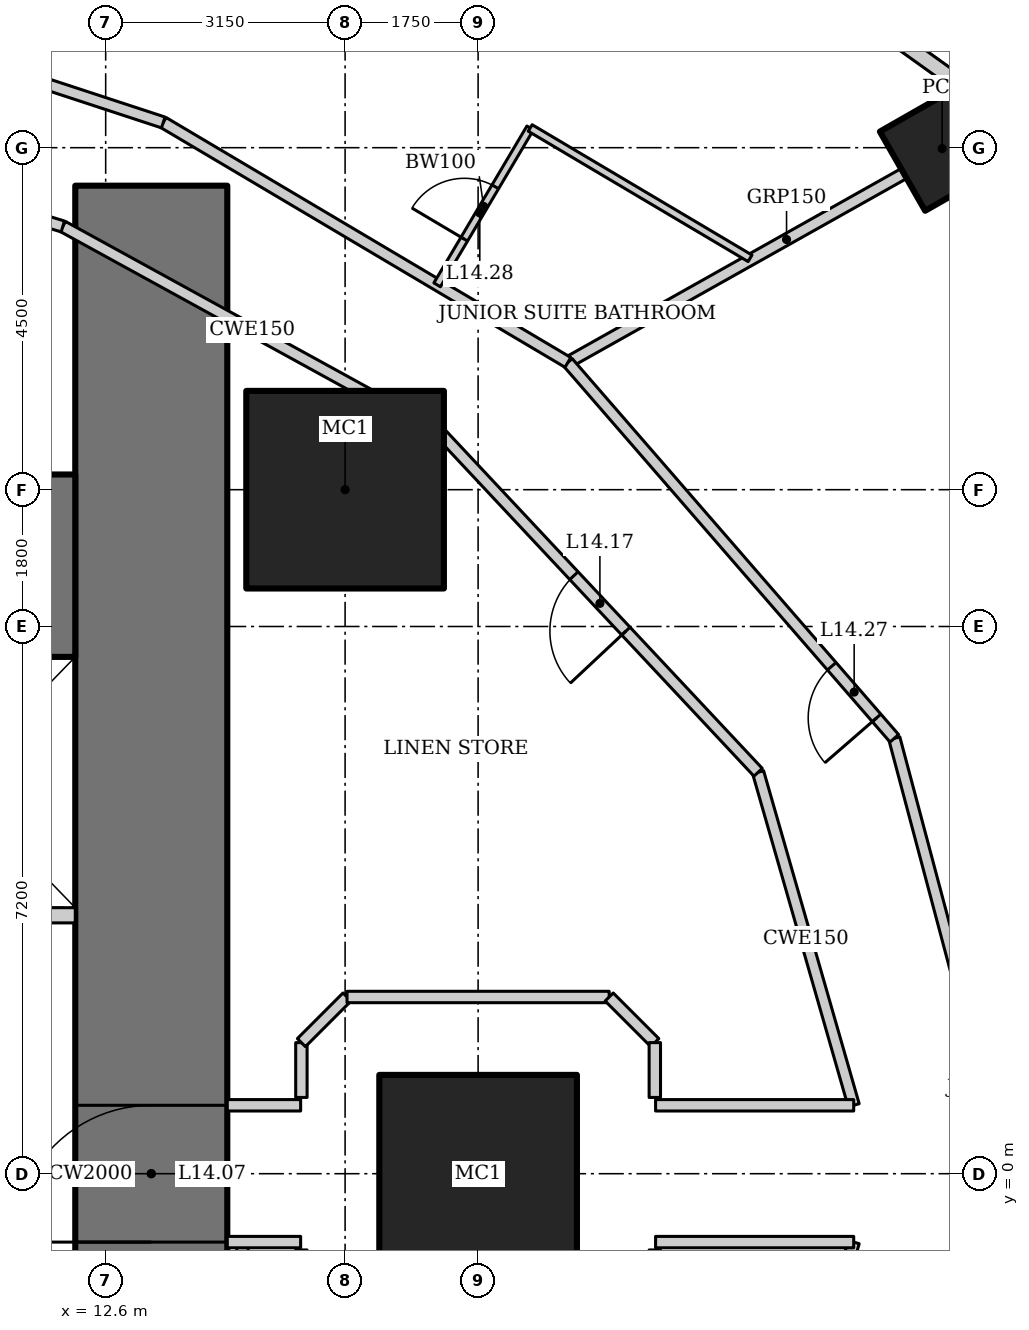
"""IFC4 building model, lengths in metres.
Left out: names, types, materials, properties, quantities, classifications, styles, units other than length and angle.
Written with IfcOpenShell. Run it as: python <this file> out.ifc"""

import sys

from ifc_helpers import new_model, si_unit, direction, frame, frame_2d, origin, origin_2d, place, context, subcontext, project, spatial, rectangle, hollow_rectangle, extrude, element, fill, save


model = new_model("IFC4")
c1 = context("Model", 3, precision=1e-05, world=origin(), true_north=direction((0.0, 1.0)))
c2 = subcontext(c1, "Body", "Model", "MODEL_VIEW")
j1 = project(units=[si_unit("LENGTHUNIT", "METRE"), si_unit("PLANEANGLEUNIT", "RADIAN")], contexts=[c1])
p1 = place(None, origin())
s1 = spatial("IfcSite", under=j1, at=p1, CompositionType="ELEMENT")
p2 = place(p1, origin())
s2 = spatial("IfcBuilding", under=s1, at=p2, CompositionType="ELEMENT")
p3 = place(p2, frame((0.0, 0.0, 65.8)))
s3 = spatial("IfcBuildingStorey", under=s2, at=p3, CompositionType="ELEMENT", Elevation=65.8)
for number, where, z_axis, x_axis in (
    (1, (17.5, 0.0, 0.0), (0.0, 0.0, 1.0), (1.0, 0.0, 0.0)),
    (2, (15.75, 9.0, 0.0), (0.0, 0.0, 1.0), (1.0, 0.0, 0.0)),
):
    element("IfcColumn", number, at=place(p3, frame(where, z_axis=z_axis, x_axis=x_axis)), inside=s3, PredefinedType="COLUMN", context=c2, shape_type="SweptSolid", body=[
        extrude(hollow_rectangle(XDim=2.6, YDim=2.6, WallThickness=0.13, at=origin_2d()), origin(), (0.0, 0.0, 1.0), 3.6),
    ])
p4 = place(p3, frame((23.605, 13.489, 0.0), z_axis=(0.0, 0.0, 1.0), x_axis=(0.86824298017, 0.496139221777, 0.0)))
e3 = element("IfcColumn", 3, at=p4, inside=s3, PredefinedType="COLUMN", context=c2, shape_type="SweptSolid", body=[
    extrude(hollow_rectangle(XDim=1.2, YDim=1.2, WallThickness=0.12, at=origin_2d()), origin(), (0.0, 0.0, 1.0), 3.6),
])
p5 = place(p3, frame((13.2, -13.0, 0.0), z_axis=(0.0, 0.0, 1.0), x_axis=(0.0, 1.0, 0.0)))
e4 = element("IfcWall", 4, at=p5, inside=s3, PredefinedType="SHEAR", context=c2, shape_type="SweptSolid", body=[
    extrude(rectangle(XDim=26.0, YDim=2.0, at=frame_2d((13.0, 0.0))), origin(), (0.0, 0.0, 1.0), 3.6),
])
p6 = place(p5, frame((12.1, 0.0, 0.0)))
e5 = element("IfcOpeningElement", 5, at=p6, cuts=e4, PredefinedType="OPENING", context=c2, shape_type="SweptSolid", body=[
    extrude(rectangle(XDim=1.8, YDim=2.1, at=frame_2d((0.9, 1.05))), frame((0.0, 1.01, 0.0), z_axis=(0.0, -1.0, 0.0), x_axis=(1.0, 0.0, 0.0)), (0.0, 0.0, 1.0), 2.02),
])
p7 = place(p3, frame((12.2, 8.0, 0.0), z_axis=(0.0, 0.0, 1.0), x_axis=(-1.0, 0.0, 0.0)))
e6 = element("IfcWall", 6, at=p7, inside=s3, PredefinedType="SHEAR", context=c2, shape_type="SweptSolid", body=[
    extrude(rectangle(XDim=24.4, YDim=2.4, at=frame_2d((12.2, 0.0))), origin(), (0.0, 0.0, 1.0), 3.6),
])
p8 = place(p3, frame((12.2, 3.4, 0.0), z_axis=(0.0, 0.0, 1.0), x_axis=(-1.0, 0.0, 0.0)))
e7 = element("IfcWall", 7, at=p8, inside=s3, PredefinedType="SOLIDWALL", context=c2, shape_type="SweptSolid", body=[
    extrude(rectangle(XDim=6.6, YDim=0.2, at=frame_2d((3.3, 0.0))), origin(), (0.0, 0.0, 1.0), 3.6),
])
p9 = place(p8, frame((4.45, 0.0, 0.0)))
e8 = element("IfcOpeningElement", 8, at=p9, cuts=e7, PredefinedType="OPENING", context=c2, shape_type="SweptSolid", body=[
    extrude(rectangle(XDim=1.1, YDim=2.2, at=frame_2d((0.55, 1.1))), frame((0.0, 0.11, 0.0), z_axis=(0.0, -1.0, 0.0), x_axis=(1.0, 0.0, 0.0)), (0.0, 0.0, 1.0), 0.22),
])
p10 = place(p8, frame((0.9, 0.0, 0.0)))
e9 = element("IfcOpeningElement", 9, at=p10, cuts=e7, PredefinedType="OPENING", context=c2, shape_type="SweptSolid", body=[
    extrude(rectangle(XDim=1.4, YDim=2.2, at=frame_2d((0.7, 1.1))), frame((0.0, 0.11, 0.0), z_axis=(0.0, -1.0, 0.0), x_axis=(1.0, 0.0, 0.0)), (0.0, 0.0, 1.0), 0.22),
])
p11 = place(p3, frame((24.482, 13.875, 0.0), z_axis=(0.0, 0.0, 1.0), x_axis=(-0.812791321576, 0.582554948112, 0.0)))
e10 = element("IfcWall", 10, at=p11, inside=s3, PredefinedType="SOLIDWALL", context=c2, shape_type="SweptSolid", body=[
    extrude(rectangle(XDim=8.063, YDim=0.2, at=frame_2d((4.032, 0.0))), origin(), (0.0, 0.0, 1.0), 3.4),
])
p12 = place(p11, frame((2.832, 0.0, 0.5)))
e11 = element("IfcOpeningElement", 11, at=p12, cuts=e10, PredefinedType="OPENING", context=c2, shape_type="SweptSolid", body=[
    extrude(rectangle(XDim=2.4, YDim=2.2, at=frame_2d((1.2, 1.1))), frame((0.0, 0.11, 0.0), z_axis=(0.0, -1.0, 0.0), x_axis=(1.0, 0.0, 0.0)), (0.0, 0.0, 1.0), 0.22),
])
p13 = place(p3, frame((24.435, 13.909, 0.0), z_axis=(0.0, 0.0, 1.0), x_axis=(-0.871747379892, -0.489955616001, 0.0)))
e12 = element("IfcWall", 12, at=p13, inside=s3, PredefinedType="PARTITIONING", context=c2, shape_type="SweptSolid", body=[
    extrude(rectangle(XDim=6.6, YDim=0.15, at=frame_2d((3.3, 0.0))), origin(), (0.0, 0.0, 1.0), 2.693),
])
p14 = place(p3, frame((24.5, 0.0, 0.0), z_axis=(0.0, 0.0, 1.0), x_axis=(-0.257083265334, 0.966389256296, 0.0)))
e13 = element("IfcWall", 13, at=p14, inside=s3, PredefinedType="PARTITIONING", context=c2, shape_type="SweptSolid", body=[
    extrude(rectangle(XDim=5.928, YDim=0.15, at=frame_2d((2.964, 0.0))), origin(), (0.0, 0.0, 1.0), 3.45),
])
p15 = place(p3, frame((22.976, 5.729, 0.0), z_axis=(0.0, 0.0, 1.0), x_axis=(-0.655599989166, 0.755108372491, 0.0)))
e14 = element("IfcWall", 14, at=p15, inside=s3, PredefinedType="PARTITIONING", context=c2, shape_type="SweptSolid", body=[
    extrude(rectangle(XDim=6.551, YDim=0.15, at=frame_2d((3.275, 0.0))), origin(), (0.0, 0.0, 1.0), 3.45),
])
p16 = place(p15, frame((0.356, 0.0, 0.0)))
e15 = element("IfcOpeningElement", 15, at=p16, cuts=e14, PredefinedType="OPENING", context=c2, shape_type="SweptSolid", body=[
    extrude(rectangle(XDim=0.9, YDim=2.1, at=frame_2d((0.45, 1.05))), frame((0.0, 0.085, 0.0), z_axis=(0.0, -1.0, 0.0), x_axis=(1.0, 0.0, 0.0)), (0.0, 0.0, 1.0), 0.17),
])
p17 = place(p3, frame((18.681, 10.675, 0.0), z_axis=(0.0, 0.0, 1.0), x_axis=(-0.860147339762, 0.510045639036, 0.0)))
e16 = element("IfcWall", 16, at=p17, inside=s3, PredefinedType="PARTITIONING", context=c2, shape_type="SweptSolid", body=[
    extrude(rectangle(XDim=6.19, YDim=0.15, at=frame_2d((3.095, 0.0))), origin(), (0.0, 0.0, 1.0), 3.45),
])
p18 = place(p3, frame((13.357, 13.832, 0.0), z_axis=(0.0, 0.0, 1.0), x_axis=(-0.950106803111, 0.311924770869, 0.0)))
e17 = element("IfcWall", 17, at=p18, inside=s3, PredefinedType="PARTITIONING", context=c2, shape_type="SweptSolid", body=[
    extrude(rectangle(XDim=5.689, YDim=0.15, at=frame_2d((2.845, 0.0))), origin(), (0.0, 0.0, 1.0), 3.45),
])
p19 = place(p18, frame((4.639, 0.0, 0.0)))
e18 = element("IfcOpeningElement", 18, at=p19, cuts=e17, PredefinedType="OPENING", context=c2, shape_type="SweptSolid", body=[
    extrude(rectangle(XDim=0.9, YDim=2.1, at=frame_2d((0.45, 1.05))), frame((0.0, 0.085, 0.0), z_axis=(0.0, -1.0, 0.0), x_axis=(1.0, 0.0, 0.0)), (0.0, 0.0, 1.0), 0.17),
])
p20 = place(p3, frame((22.976, -5.729, 0.0), z_axis=(0.0, 0.0, 1.0), x_axis=(0.257083265334, 0.966389256296, 0.0)))
e19 = element("IfcWall", 19, at=p20, inside=s3, PredefinedType="PARTITIONING", context=c2, shape_type="SweptSolid", body=[
    extrude(rectangle(XDim=5.928, YDim=0.15, at=frame_2d((2.964, 0.0))), origin(), (0.0, 0.0, 1.0), 3.45),
])
p21 = place(p20, frame((1.794, 0.0, 0.0)))
e20 = element("IfcOpeningElement", 20, at=p21, cuts=e19, PredefinedType="OPENING", context=c2, shape_type="SweptSolid", body=[
    extrude(rectangle(XDim=0.9, YDim=2.1, at=frame_2d((0.45, 1.05))), frame((0.0, 0.085, 0.0), z_axis=(0.0, -1.0, 0.0), x_axis=(1.0, 0.0, 0.0)), (0.0, 0.0, 1.0), 0.17),
])
p22 = place(p3, frame((22.442, 0.9, 0.0), z_axis=(0.0, 0.0, 1.0), x_axis=(-0.27585972825, 0.961197903831, 0.0)))
e21 = element("IfcWall", 21, at=p22, inside=s3, PredefinedType="PARTITIONING", context=c2, shape_type="SweptSolid", body=[
    extrude(rectangle(XDim=4.559, YDim=0.15, at=frame_2d((2.279, 0.0))), origin(), (0.0, 0.0, 1.0), 3.45),
])
p23 = place(p3, frame((21.184, 5.282, 0.0), z_axis=(0.0, 0.0, 1.0), x_axis=(-0.68365836236, 0.729802194828, 0.0)))
e22 = element("IfcWall", 22, at=p23, inside=s3, PredefinedType="PARTITIONING", context=c2, shape_type="SweptSolid", body=[
    extrude(rectangle(XDim=6.09, YDim=0.15, at=frame_2d((3.045, 0.0))), origin(), (0.0, 0.0, 1.0), 3.45),
])
p24 = place(p23, frame((2.545, 0.0, 0.0)))
e23 = element("IfcOpeningElement", 23, at=p24, cuts=e22, PredefinedType="OPENING", context=c2, shape_type="SweptSolid", body=[
    extrude(rectangle(XDim=1.0, YDim=2.1, at=frame_2d((0.5, 1.05))), frame((0.0, 0.085, 0.0), z_axis=(0.0, -1.0, 0.0), x_axis=(1.0, 0.0, 0.0)), (0.0, 0.0, 1.0), 0.17),
])
p25 = place(p3, frame((17.021, 9.726, 0.0), z_axis=(0.0, 0.0, 1.0), x_axis=(-0.876522084062, 0.481361647986, 0.0)))
e24 = element("IfcWall", 24, at=p25, inside=s3, PredefinedType="PARTITIONING", context=c2, shape_type="SweptSolid", body=[
    extrude(rectangle(XDim=5.687, YDim=0.15, at=frame_2d((2.844, 0.0))), origin(), (0.0, 0.0, 1.0), 3.45),
])
p26 = place(p3, frame((12.036, 12.464, 0.0), z_axis=(0.0, 0.0, 1.0), x_axis=(-0.956795045135, 0.290763205385, 0.0)))
e25 = element("IfcWall", 25, at=p26, inside=s3, PredefinedType="PARTITIONING", context=c2, shape_type="SweptSolid", body=[
    extrude(rectangle(XDim=5.146, YDim=0.15, at=frame_2d((2.573, 0.0))), origin(), (0.0, 0.0, 1.0), 3.45),
])
p27 = place(p26, frame((0.816, 0.0, 0.0)))
e26 = element("IfcOpeningElement", 26, at=p27, cuts=e25, PredefinedType="OPENING", context=c2, shape_type="SweptSolid", body=[
    extrude(rectangle(XDim=0.9, YDim=2.1, at=frame_2d((0.45, 1.05))), frame((0.0, 0.085, 0.0), z_axis=(0.0, -1.0, 0.0), x_axis=(1.0, 0.0, 0.0)), (0.0, 0.0, 1.0), 0.17),
])
p28 = place(p3, frame((21.184, -5.282, 0.0), z_axis=(0.0, 0.0, 1.0), x_axis=(0.27585972825, 0.961197903831, 0.0)))
e27 = element("IfcWall", 27, at=p28, inside=s3, PredefinedType="PARTITIONING", context=c2, shape_type="SweptSolid", body=[
    extrude(rectangle(XDim=4.559, YDim=0.15, at=frame_2d((2.279, 0.0))), origin(), (0.0, 0.0, 1.0), 3.45),
])
p29 = place(p3, frame((14.4, -11.017, 0.0), z_axis=(0.0, 0.0, 1.0), x_axis=(0.0, 1.0, 0.0)))
e28 = element("IfcWall", 28, at=p29, inside=s3, PredefinedType="PARTITIONING", context=c2, shape_type="SweptSolid", body=[
    extrude(rectangle(XDim=10.117, YDim=0.15, at=frame_2d((5.059, 0.0))), origin(), (0.0, 0.0, 1.0), 3.45),
])
p30 = place(p3, frame((16.961, 11.695, 0.0), z_axis=(0.0, 0.0, 1.0), x_axis=(0.510075642074, 0.860129548012, 0.0)))
e29 = element("IfcWall", 29, at=p30, inside=s3, PredefinedType="PARTITIONING", context=c2, shape_type="SweptSolid", body=[
    extrude(rectangle(XDim=2.4, YDim=0.1, at=frame_2d((1.2, 0.0))), origin(), (0.0, 0.0, 1.0), 3.45),
])
p31 = place(p30, frame((0.7, 0.0, 0.0)))
e30 = element("IfcOpeningElement", 30, at=p31, cuts=e29, PredefinedType="OPENING", context=c2, shape_type="SweptSolid", body=[
    extrude(rectangle(XDim=0.8, YDim=2.1, at=frame_2d((0.4, 1.05))), frame((0.0, 0.06, 0.0), z_axis=(0.0, -1.0, 0.0), x_axis=(1.0, 0.0, 0.0)), (0.0, 0.0, 1.0), 0.12),
])
p32 = place(p3, frame((18.185, 13.76, 0.0), z_axis=(0.0, 0.0, 1.0), x_axis=(0.860146437071, -0.510047161343, 0.0)))
e31 = element("IfcWall", 31, at=p32, inside=s3, PredefinedType="PARTITIONING", context=c2, shape_type="SweptSolid", body=[
    extrude(rectangle(XDim=3.363, YDim=0.1, at=frame_2d((1.681, 0.0))), origin(), (0.0, 0.0, 1.0), 3.45),
])
p33 = place(p3, frame((14.2, -0.9, 0.0), z_axis=(0.0, 0.0, 1.0), x_axis=(1.0, 0.0, 0.0)))
e32 = element("IfcWall", 32, at=p33, inside=s3, PredefinedType="PARTITIONING", context=c2, shape_type="SweptSolid", body=[
    extrude(rectangle(XDim=0.965, YDim=0.15, at=frame_2d((0.482, 0.0))), origin(), (0.0, 0.0, 1.0), 3.45),
])
p34 = place(p3, frame((19.835, -0.9, 0.0), z_axis=(0.0, 0.0, 1.0), x_axis=(1.0, 0.0, 0.0)))
e33 = element("IfcWall", 33, at=p34, inside=s3, PredefinedType="PARTITIONING", context=c2, shape_type="SweptSolid", body=[
    extrude(rectangle(XDim=2.607, YDim=0.15, at=frame_2d((1.303, 0.0))), origin(), (0.0, 0.0, 1.0), 3.45),
])
p35 = place(p3, frame((14.2, 0.9, 0.0), z_axis=(0.0, 0.0, 1.0), x_axis=(1.0, 0.0, 0.0)))
e34 = element("IfcWall", 34, at=p35, inside=s3, PredefinedType="PARTITIONING", context=c2, shape_type="SweptSolid", body=[
    extrude(rectangle(XDim=0.965, YDim=0.15, at=frame_2d((0.482, 0.0))), origin(), (0.0, 0.0, 1.0), 3.45),
])
p36 = place(p3, frame((19.835, 0.9, 0.0), z_axis=(0.0, 0.0, 1.0), x_axis=(1.0, 0.0, 0.0)))
e35 = element("IfcWall", 35, at=p36, inside=s3, PredefinedType="PARTITIONING", context=c2, shape_type="SweptSolid", body=[
    extrude(rectangle(XDim=2.607, YDim=0.15, at=frame_2d((1.303, 0.0))), origin(), (0.0, 0.0, 1.0), 3.45),
])
p37 = place(p3, frame((15.175, 1.003, 0.0), z_axis=(0.0, 0.0, 1.0), x_axis=(0.0, 1.0, 0.0)))
e36 = element("IfcWall", 36, at=p37, inside=s3, PredefinedType="PARTITIONING", context=c2, shape_type="SweptSolid", body=[
    extrude(rectangle(XDim=0.721, YDim=0.15, at=frame_2d((0.361, 0.0))), origin(), (0.0, 0.0, 1.0), 3.45),
])
p38 = place(p3, frame((15.175, 1.725, 0.0), z_axis=(0.0, 0.0, 1.0), x_axis=(0.707106781187, 0.707106781187, 0.0)))
e37 = element("IfcWall", 37, at=p38, inside=s3, PredefinedType="PARTITIONING", context=c2, shape_type="SweptSolid", body=[
    extrude(rectangle(XDim=0.849, YDim=0.15, at=frame_2d((0.425, 0.0))), origin(), (0.0, 0.0, 1.0), 3.45),
])
p39 = place(p3, frame((15.775, 2.325, 0.0), z_axis=(0.0, 0.0, 1.0), x_axis=(1.0, 0.0, 0.0)))
e38 = element("IfcWall", 38, at=p39, inside=s3, PredefinedType="PARTITIONING", context=c2, shape_type="SweptSolid", body=[
    extrude(rectangle(XDim=3.449, YDim=0.15, at=frame_2d((1.725, 0.0))), origin(), (0.0, 0.0, 1.0), 3.45),
])
p40 = place(p3, frame((19.225, 2.325, 0.0), z_axis=(0.0, 0.0, 1.0), x_axis=(0.707106781187, -0.707106781187, 0.0)))
e39 = element("IfcWall", 39, at=p40, inside=s3, PredefinedType="PARTITIONING", context=c2, shape_type="SweptSolid", body=[
    extrude(rectangle(XDim=0.849, YDim=0.15, at=frame_2d((0.425, 0.0))), origin(), (0.0, 0.0, 1.0), 3.45),
])
p41 = place(p3, frame((19.825, 1.725, 0.0), z_axis=(0.0, 0.0, 1.0), x_axis=(0.0, -1.0, 0.0)))
e40 = element("IfcWall", 40, at=p41, inside=s3, PredefinedType="PARTITIONING", context=c2, shape_type="SweptSolid", body=[
    extrude(rectangle(XDim=0.721, YDim=0.15, at=frame_2d((0.361, 0.0))), origin(), (0.0, 0.0, 1.0), 3.45),
])
p42 = place(p6, origin())
e41 = element("IfcDoor", 41, at=p42, inside=s3, OperationType="DOUBLE_DOOR_DOUBLE_SWING", PredefinedType="DOOR", context=c2, shape_type="SweptSolid", body=[
    extrude(rectangle(XDim=1.8, YDim=2.1, at=frame_2d((0.9, 1.05))), frame((0.0, 0.025, 0.0), z_axis=(0.0, -1.0, 0.0), x_axis=(1.0, 0.0, 0.0)), (0.0, 0.0, 1.0), 0.05),
])
fill(e5, e41)
p43 = place(p24, origin())
e42 = element("IfcDoor", 42, at=p43, inside=s3, OperationType="SINGLE_SWING_LEFT", PredefinedType="DOOR", context=c2, shape_type="SweptSolid", body=[
    extrude(rectangle(XDim=1.0, YDim=2.1, at=frame_2d((0.5, 1.05))), frame((0.0, 0.025, 0.0), z_axis=(0.0, -1.0, 0.0), x_axis=(1.0, 0.0, 0.0)), (0.0, 0.0, 1.0), 0.05),
])
fill(e23, e42)
p44 = place(p16, origin())
e43 = element("IfcDoor", 43, at=p44, inside=s3, OperationType="SINGLE_SWING_LEFT", PredefinedType="DOOR", context=c2, shape_type="SweptSolid", body=[
    extrude(rectangle(XDim=0.9, YDim=2.1, at=frame_2d((0.45, 1.05))), frame((0.0, 0.025, 0.0), z_axis=(0.0, -1.0, 0.0), x_axis=(1.0, 0.0, 0.0)), (0.0, 0.0, 1.0), 0.05),
])
fill(e15, e43)
p45 = place(p31, origin())
e44 = element("IfcDoor", 44, at=p45, inside=s3, OperationType="SINGLE_SWING_LEFT", PredefinedType="DOOR", context=c2, shape_type="SweptSolid", body=[
    extrude(rectangle(XDim=0.8, YDim=2.1, at=frame_2d((0.4, 1.05))), frame((0.0, 0.025, 0.0), z_axis=(0.0, -1.0, 0.0), x_axis=(1.0, 0.0, 0.0)), (0.0, 0.0, 1.0), 0.05),
])
fill(e30, e44)
save(model, sys.argv[1])
